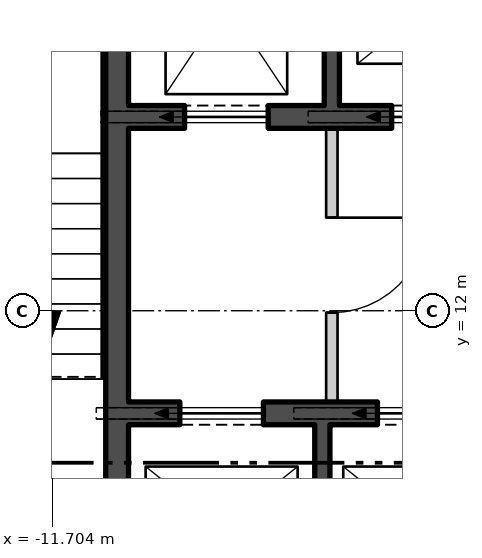
"""IFC4 building model, lengths in metres.
Left out: names, types, materials, properties, quantities, classifications, styles, units other than length and angle.
Written with IfcOpenShell. Run it as: python <this file> out.ifc"""

import sys

from ifc_helpers import new_model, si_unit, direction, frame, frame_2d, origin, place, context, subcontext, project, spatial, polyline, rectangle, outline, extrude, element, fill, save


model = new_model("IFC4")
c1 = context("Model", 3, precision=1e-05, world=origin(), true_north=direction((0.0, 1.0)))
c2 = subcontext(c1, "Body", "Model", "MODEL_VIEW")
j1 = project(units=[si_unit("LENGTHUNIT", "METRE"), si_unit("PLANEANGLEUNIT", "RADIAN")], contexts=[c1])
p1 = place(None, origin())
s1 = spatial("IfcSite", under=j1, at=p1, CompositionType="ELEMENT")
p2 = place(p1, origin())
s2 = spatial("IfcBuilding", under=s1, at=p2, CompositionType="ELEMENT")
p3 = place(p2, frame((0.0, 0.0, 78.3)))
s3 = spatial("IfcBuildingStorey", under=s2, at=p3, CompositionType="ELEMENT", Elevation=78.3)
p4 = place(p3, frame((-28.09, 10.934, -0.18), z_axis=(0.0, 0.0, 1.0), x_axis=(0.500000711659, -0.866024992908, 0.0)))
e1 = element("IfcWall", 1, at=p4, inside=s3, PredefinedType="SOLIDWALL", context=c2, shape_type="SweptSolid", body=[
    extrude(outline(polyline([(-0.13, -0.225), (45.87, -0.225), (45.61, 0.225), (0.13, 0.225), (-0.13, -0.225)])), origin(), (0.0, 0.0, 1.0), 6.0),
])
p5 = place(p4, frame((1.424, 0.0, 1.38)))
e2 = element("IfcOpeningElement", 2, at=p5, cuts=e1, PredefinedType="OPENING", context=c2, shape_type="SweptSolid", body=[
    extrude(rectangle(XDim=2.4, YDim=3.6, at=frame_2d((1.2, 1.8))), frame((0.0, 0.235, 0.0), z_axis=(0.0, -1.0, 0.0), x_axis=(1.0, 0.0, 0.0)), (0.0, 0.0, 1.0), 0.47),
])
p6 = place(p4, frame((5.893, 0.0, 1.38)))
e3 = element("IfcOpeningElement", 3, at=p6, cuts=e1, PredefinedType="OPENING", context=c2, shape_type="SweptSolid", body=[
    extrude(rectangle(XDim=2.4, YDim=3.6, at=frame_2d((1.2, 1.8))), frame((0.0, 0.235, 0.0), z_axis=(0.0, -1.0, 0.0), x_axis=(1.0, 0.0, 0.0)), (0.0, 0.0, 1.0), 0.47),
])
p7 = place(p4, frame((10.401, 0.0, 1.38)))
e4 = element("IfcOpeningElement", 4, at=p7, cuts=e1, PredefinedType="OPENING", context=c2, shape_type="SweptSolid", body=[
    extrude(rectangle(XDim=2.4, YDim=3.6, at=frame_2d((1.2, 1.8))), frame((0.0, 0.235, 0.0), z_axis=(0.0, -1.0, 0.0), x_axis=(1.0, 0.0, 0.0)), (0.0, 0.0, 1.0), 0.47),
])
p8 = place(p4, frame((14.909, 0.0, 1.38)))
e5 = element("IfcOpeningElement", 5, at=p8, cuts=e1, PredefinedType="OPENING", context=c2, shape_type="SweptSolid", body=[
    extrude(rectangle(XDim=2.4, YDim=3.6, at=frame_2d((1.2, 1.8))), frame((0.0, 0.235, 0.0), z_axis=(0.0, -1.0, 0.0), x_axis=(1.0, 0.0, 0.0)), (0.0, 0.0, 1.0), 0.47),
])
p9 = place(p4, frame((19.416, 0.0, 1.38)))
e6 = element("IfcOpeningElement", 6, at=p9, cuts=e1, PredefinedType="OPENING", context=c2, shape_type="SweptSolid", body=[
    extrude(rectangle(XDim=2.4, YDim=3.6, at=frame_2d((1.2, 1.8))), frame((0.0, 0.235, 0.0), z_axis=(0.0, -1.0, 0.0), x_axis=(1.0, 0.0, 0.0)), (0.0, 0.0, 1.0), 0.47),
])
p10 = place(p4, frame((23.924, 0.0, 1.38)))
e7 = element("IfcOpeningElement", 7, at=p10, cuts=e1, PredefinedType="OPENING", context=c2, shape_type="SweptSolid", body=[
    extrude(rectangle(XDim=2.4, YDim=3.6, at=frame_2d((1.2, 1.8))), frame((0.0, 0.235, 0.0), z_axis=(0.0, -1.0, 0.0), x_axis=(1.0, 0.0, 0.0)), (0.0, 0.0, 1.0), 0.47),
])
p11 = place(p4, frame((28.431, 0.0, 1.38)))
e8 = element("IfcOpeningElement", 8, at=p11, cuts=e1, PredefinedType="OPENING", context=c2, shape_type="SweptSolid", body=[
    extrude(rectangle(XDim=2.4, YDim=3.6, at=frame_2d((1.2, 1.8))), frame((0.0, 0.235, 0.0), z_axis=(0.0, -1.0, 0.0), x_axis=(1.0, 0.0, 0.0)), (0.0, 0.0, 1.0), 0.47),
])
p12 = place(p4, frame((32.939, 0.0, 1.38)))
e9 = element("IfcOpeningElement", 9, at=p12, cuts=e1, PredefinedType="OPENING", context=c2, shape_type="SweptSolid", body=[
    extrude(rectangle(XDim=2.4, YDim=3.6, at=frame_2d((1.2, 1.8))), frame((0.0, 0.235, 0.0), z_axis=(0.0, -1.0, 0.0), x_axis=(1.0, 0.0, 0.0)), (0.0, 0.0, 1.0), 0.47),
])
p13 = place(p4, frame((37.447, 0.0, 1.38)))
e10 = element("IfcOpeningElement", 10, at=p13, cuts=e1, PredefinedType="OPENING", context=c2, shape_type="SweptSolid", body=[
    extrude(rectangle(XDim=2.4, YDim=3.6, at=frame_2d((1.2, 1.8))), frame((0.0, 0.235, 0.0), z_axis=(0.0, -1.0, 0.0), x_axis=(1.0, 0.0, 0.0)), (0.0, 0.0, 1.0), 0.47),
])
p14 = place(p4, frame((41.916, 0.0, 1.38)))
e11 = element("IfcOpeningElement", 11, at=p14, cuts=e1, PredefinedType="OPENING", context=c2, shape_type="SweptSolid", body=[
    extrude(rectangle(XDim=2.4, YDim=3.6, at=frame_2d((1.2, 1.8))), frame((0.0, 0.235, 0.0), z_axis=(0.0, -1.0, 0.0), x_axis=(1.0, 0.0, 0.0)), (0.0, 0.0, 1.0), 0.47),
])
p15 = place(p3, frame((-10.85, 0.6, 0.0), z_axis=(0.0, 0.0, 1.0), x_axis=(0.0, 1.0, 0.0)))
e12 = element("IfcWall", 12, at=p15, inside=s3, PredefinedType="SHEAR", context=c2, shape_type="SweptSolid", body=[
    extrude(rectangle(XDim=16.8, YDim=0.3, at=frame_2d((8.4, 0.0))), origin(), (0.0, 0.0, 1.0), 5.8),
])
p16 = place(p15, frame((5.075, 0.0, 0.0)))
e13 = element("IfcOpeningElement", 13, at=p16, cuts=e12, PredefinedType="OPENING", context=c2, shape_type="SweptSolid", body=[
    extrude(rectangle(XDim=1.25, YDim=2.1, at=frame_2d((0.625, 1.05))), frame((0.0, 0.16, 0.0), z_axis=(0.0, -1.0, 0.0), x_axis=(1.0, 0.0, 0.0)), (0.0, 0.0, 1.0), 0.32),
])
p17 = place(p15, frame((1.525, 0.0, 0.0)))
e14 = element("IfcOpeningElement", 14, at=p17, cuts=e12, PredefinedType="OPENING", context=c2, shape_type="SweptSolid", body=[
    extrude(rectangle(XDim=1.0, YDim=2.1, at=frame_2d((0.5, 1.05))), frame((0.0, 0.16, 0.0), z_axis=(0.0, -1.0, 0.0), x_axis=(1.0, 0.0, 0.0)), (0.0, 0.0, 1.0), 0.32),
])
p18 = place(p3, frame((-10.7, 14.55, 0.0), z_axis=(0.0, 0.0, 1.0), x_axis=(1.0, 0.0, 0.0)))
e15 = element("IfcWall", 15, at=p18, inside=s3, PredefinedType="SHEAR", context=c2, shape_type="SweptSolid", body=[
    extrude(rectangle(XDim=21.4, YDim=0.3, at=frame_2d((10.7, 0.0))), origin(), (0.0, 0.0, 1.0), 5.8),
])
p19 = place(p18, frame((0.738, 0.0, 0.0)))
e16 = element("IfcOpeningElement", 16, at=p19, cuts=e15, PredefinedType="OPENING", context=c2, shape_type="SweptSolid", body=[
    extrude(rectangle(XDim=1.1, YDim=2.1, at=frame_2d((0.55, 1.05))), frame((0.0, 0.16, 0.0), z_axis=(0.0, -1.0, 0.0), x_axis=(1.0, 0.0, 0.0)), (0.0, 0.0, 1.0), 0.32),
])
p20 = place(p18, frame((3.462, 0.0, 0.0)))
e17 = element("IfcOpeningElement", 17, at=p20, cuts=e15, PredefinedType="OPENING", context=c2, shape_type="SweptSolid", body=[
    extrude(rectangle(XDim=1.1, YDim=2.1, at=frame_2d((0.55, 1.05))), frame((0.0, 0.16, 0.0), z_axis=(0.0, -1.0, 0.0), x_axis=(1.0, 0.0, 0.0)), (0.0, 0.0, 1.0), 0.32),
])
p21 = place(p18, frame((6.138, 0.0, 0.0)))
e18 = element("IfcOpeningElement", 18, at=p21, cuts=e15, PredefinedType="OPENING", context=c2, shape_type="SweptSolid", body=[
    extrude(rectangle(XDim=1.1, YDim=2.1, at=frame_2d((0.55, 1.05))), frame((0.0, 0.16, 0.0), z_axis=(0.0, -1.0, 0.0), x_axis=(1.0, 0.0, 0.0)), (0.0, 0.0, 1.0), 0.32),
])
p22 = place(p18, frame((8.812, 0.0, 0.0)))
e19 = element("IfcOpeningElement", 19, at=p22, cuts=e15, PredefinedType="OPENING", context=c2, shape_type="SweptSolid", body=[
    extrude(rectangle(XDim=1.1, YDim=2.1, at=frame_2d((0.55, 1.05))), frame((0.0, 0.16, 0.0), z_axis=(0.0, -1.0, 0.0), x_axis=(1.0, 0.0, 0.0)), (0.0, 0.0, 1.0), 0.32),
])
p23 = place(p18, frame((14.162, 0.0, 0.0)))
e20 = element("IfcOpeningElement", 20, at=p23, cuts=e15, PredefinedType="OPENING", context=c2, shape_type="SweptSolid", body=[
    extrude(rectangle(XDim=1.1, YDim=2.1, at=frame_2d((0.55, 1.05))), frame((0.0, 0.16, 0.0), z_axis=(0.0, -1.0, 0.0), x_axis=(1.0, 0.0, 0.0)), (0.0, 0.0, 1.0), 0.32),
])
p24 = place(p18, frame((16.837, 0.0, 0.0)))
e21 = element("IfcOpeningElement", 21, at=p24, cuts=e15, PredefinedType="OPENING", context=c2, shape_type="SweptSolid", body=[
    extrude(rectangle(XDim=1.1, YDim=2.1, at=frame_2d((0.55, 1.05))), frame((0.0, 0.16, 0.0), z_axis=(0.0, -1.0, 0.0), x_axis=(1.0, 0.0, 0.0)), (0.0, 0.0, 1.0), 0.32),
])
p25 = place(p18, frame((19.562, 0.0, 0.0)))
e22 = element("IfcOpeningElement", 22, at=p25, cuts=e15, PredefinedType="OPENING", context=c2, shape_type="SweptSolid", body=[
    extrude(rectangle(XDim=1.1, YDim=2.1, at=frame_2d((0.55, 1.05))), frame((0.0, 0.16, 0.0), z_axis=(0.0, -1.0, 0.0), x_axis=(1.0, 0.0, 0.0)), (0.0, 0.0, 1.0), 0.32),
])
p26 = place(p3, frame((-10.7, 10.65, 0.0), z_axis=(0.0, 0.0, 1.0), x_axis=(1.0, 0.0, 0.0)))
e23 = element("IfcWall", 23, at=p26, inside=s3, PredefinedType="SHEAR", context=c2, shape_type="SweptSolid", body=[
    extrude(rectangle(XDim=10.3, YDim=0.3, at=frame_2d((5.15, 0.0))), origin(), (0.0, 0.0, 1.0), 5.8),
])
p27 = place(p26, frame((0.675, 0.0, 0.0)))
e24 = element("IfcOpeningElement", 24, at=p27, cuts=e23, PredefinedType="OPENING", context=c2, shape_type="SweptSolid", body=[
    extrude(rectangle(XDim=1.1, YDim=2.1, at=frame_2d((0.55, 1.05))), frame((0.0, 0.16, 0.0), z_axis=(0.0, -1.0, 0.0), x_axis=(1.0, 0.0, 0.0)), (0.0, 0.0, 1.0), 0.32),
])
p28 = place(p26, frame((3.275, 0.0, 0.0)))
e25 = element("IfcOpeningElement", 25, at=p28, cuts=e23, PredefinedType="OPENING", context=c2, shape_type="SweptSolid", body=[
    extrude(rectangle(XDim=1.1, YDim=2.1, at=frame_2d((0.55, 1.05))), frame((0.0, 0.16, 0.0), z_axis=(0.0, -1.0, 0.0), x_axis=(1.0, 0.0, 0.0)), (0.0, 0.0, 1.0), 0.32),
])
p29 = place(p26, frame((5.825, 0.0, 0.0)))
e26 = element("IfcOpeningElement", 26, at=p29, cuts=e23, PredefinedType="OPENING", context=c2, shape_type="SweptSolid", body=[
    extrude(rectangle(XDim=1.1, YDim=2.1, at=frame_2d((0.55, 1.05))), frame((0.0, 0.16, 0.0), z_axis=(0.0, -1.0, 0.0), x_axis=(1.0, 0.0, 0.0)), (0.0, 0.0, 1.0), 0.32),
])
p30 = place(p26, frame((8.375, 0.0, 0.0)))
e27 = element("IfcOpeningElement", 27, at=p30, cuts=e23, PredefinedType="OPENING", context=c2, shape_type="SweptSolid", body=[
    extrude(rectangle(XDim=1.1, YDim=2.1, at=frame_2d((0.55, 1.05))), frame((0.0, 0.16, 0.0), z_axis=(0.0, -1.0, 0.0), x_axis=(1.0, 0.0, 0.0)), (0.0, 0.0, 1.0), 0.32),
])
for number, where, z_axis, x_axis in (
    (28, (-8.025, 14.7, 0.0), (0.0, 0.0, 1.0), (0.0, 1.0, 0.0)),
    (29, (-8.15, 7.8, 0.0), (0.0, 0.0, 1.0), (0.0, 1.0, 0.0)),
):
    element("IfcWall", number, at=place(p3, frame(where, z_axis=z_axis, x_axis=x_axis)), inside=s3, PredefinedType="SHEAR", context=c2, shape_type="SweptSolid", body=[
        extrude(rectangle(XDim=2.7, YDim=0.2, at=frame_2d((1.35, 0.0))), origin(), (0.0, 0.0, 1.0), 5.8),
    ])
p31 = place(p3, frame((-8.025, 10.8, 0.0), z_axis=(0.0, 0.0, 1.0), x_axis=(0.0, 1.0, 0.0)))
e30 = element("IfcWall", 30, at=p31, inside=s3, PredefinedType="PARTITIONING", context=c2, shape_type="SweptSolid", body=[
    extrude(rectangle(XDim=3.6, YDim=0.15, at=frame_2d((1.8, 0.0))), origin(), (0.0, 0.0, 1.0), 5.8),
])
p32 = place(p31, frame((1.175, 0.0, 0.0)))
e31 = element("IfcOpeningElement", 31, at=p32, cuts=e30, PredefinedType="OPENING", context=c2, shape_type="SweptSolid", body=[
    extrude(rectangle(XDim=1.25, YDim=2.1, at=frame_2d((0.625, 1.05))), frame((0.0, 0.085, 0.0), z_axis=(0.0, -1.0, 0.0), x_axis=(1.0, 0.0, 0.0)), (0.0, 0.0, 1.0), 0.17),
])
p33 = place(p19, origin())
e32 = element("IfcDoor", 32, at=p33, inside=s3, OperationType="SLIDING_TO_LEFT", PredefinedType="DOOR", context=c2, shape_type="SweptSolid", body=[
    extrude(rectangle(XDim=1.1, YDim=2.1, at=frame_2d((0.55, 1.05))), frame((0.0, 0.025, 0.0), z_axis=(0.0, -1.0, 0.0), x_axis=(1.0, 0.0, 0.0)), (0.0, 0.0, 1.0), 0.05),
])
fill(e16, e32)
p34 = place(p20, origin())
e33 = element("IfcDoor", 33, at=p34, inside=s3, OperationType="SLIDING_TO_LEFT", PredefinedType="DOOR", context=c2, shape_type="SweptSolid", body=[
    extrude(rectangle(XDim=1.1, YDim=2.1, at=frame_2d((0.55, 1.05))), frame((0.0, 0.025, 0.0), z_axis=(0.0, -1.0, 0.0), x_axis=(1.0, 0.0, 0.0)), (0.0, 0.0, 1.0), 0.05),
])
fill(e17, e33)
p35 = place(p27, origin())
e34 = element("IfcDoor", 34, at=p35, inside=s3, OperationType="SLIDING_TO_LEFT", PredefinedType="DOOR", context=c2, shape_type="SweptSolid", body=[
    extrude(rectangle(XDim=1.1, YDim=2.1, at=frame_2d((0.55, 1.05))), frame((0.0, 0.025, 0.0), z_axis=(0.0, -1.0, 0.0), x_axis=(1.0, 0.0, 0.0)), (0.0, 0.0, 1.0), 0.05),
])
fill(e24, e34)
p36 = place(p28, origin())
e35 = element("IfcDoor", 35, at=p36, inside=s3, OperationType="SLIDING_TO_LEFT", PredefinedType="DOOR", context=c2, shape_type="SweptSolid", body=[
    extrude(rectangle(XDim=1.1, YDim=2.1, at=frame_2d((0.55, 1.05))), frame((0.0, 0.025, 0.0), z_axis=(0.0, -1.0, 0.0), x_axis=(1.0, 0.0, 0.0)), (0.0, 0.0, 1.0), 0.05),
])
fill(e25, e35)
p37 = place(p32, origin())
e36 = element("IfcDoor", 36, at=p37, inside=s3, OperationType="SINGLE_SWING_RIGHT", PredefinedType="DOOR", context=c2, shape_type="SweptSolid", body=[
    extrude(rectangle(XDim=1.25, YDim=2.1, at=frame_2d((0.625, 1.05))), frame((0.0, 0.025, 0.0), z_axis=(0.0, -1.0, 0.0), x_axis=(1.0, 0.0, 0.0)), (0.0, 0.0, 1.0), 0.05),
])
fill(e31, e36)
save(model, sys.argv[1])
